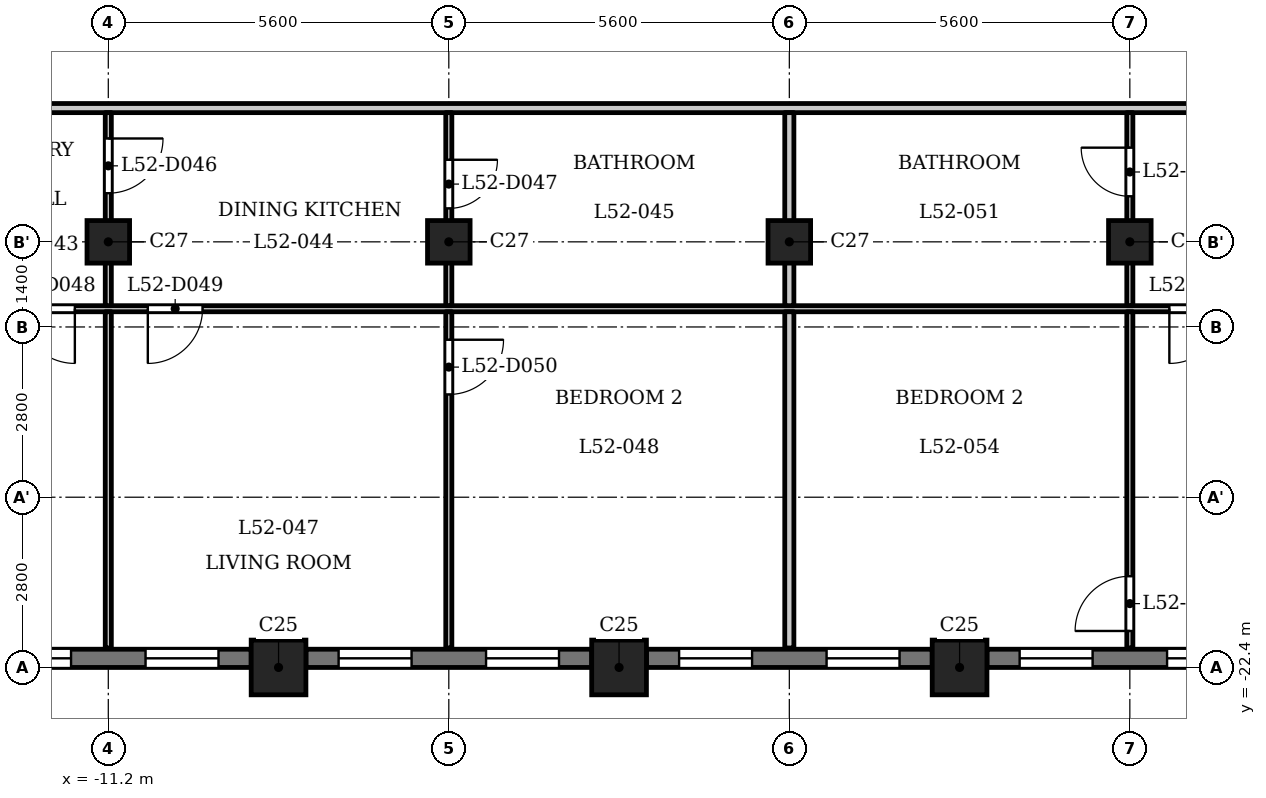
"""IFC4 building model, lengths in metres.
Left out: names, types, materials, properties, quantities, classifications, styles, units other than length and angle.
Written with IfcOpenShell. Run it as: python <this file> out.ifc"""

import sys

from ifc_helpers import new_model, si_unit, direction, frame, frame_2d, origin, origin_2d, place, context, subcontext, project, spatial, rectangle, extrude, element, fill, save


model = new_model("IFC4")
c1 = context("Model", 3, precision=1e-05, world=origin(), true_north=direction((0.0, 1.0)))
c2 = subcontext(c1, "Body", "Model", "MODEL_VIEW")
j1 = project(units=[si_unit("LENGTHUNIT", "METRE"), si_unit("PLANEANGLEUNIT", "RADIAN")], contexts=[c1])
p1 = place(None, origin())
s1 = spatial("IfcSite", under=j1, at=p1, CompositionType="ELEMENT")
p2 = place(p1, origin())
s2 = spatial("IfcBuilding", under=s1, at=p2, CompositionType="ELEMENT")
p3 = place(p2, frame((0.0, 0.0, 202.9)))
s3 = spatial("IfcBuildingStorey", under=s2, at=p3, CompositionType="ELEMENT", Elevation=202.9)
for number, where, z_axis, x_axis in (
    (1, (-8.4, -22.4, 0.0), (0.0, 0.0, 1.0), (1.0, 0.0, 0.0)),
    (2, (-2.8, -22.4, 0.0), (0.0, 0.0, 1.0), (1.0, 0.0, 0.0)),
    (3, (2.8, -22.4, 0.0), (0.0, 0.0, 1.0), (1.0, 0.0, 0.0)),
):
    element("IfcColumn", number, at=place(p3, frame(where, z_axis=z_axis, x_axis=x_axis)), inside=s3, PredefinedType="COLUMN", context=c2, shape_type="SweptSolid", body=[
        extrude(rectangle(XDim=0.9, YDim=0.9, at=origin_2d()), origin(), (0.0, 0.0, 1.0), 3.5),
    ])
for number, where, z_axis, x_axis in (
    (4, (-11.2, -15.4, 0.0), (0.0, 0.0, 1.0), (1.0, 0.0, 0.0)),
    (5, (-5.6, -15.4, 0.0), (0.0, 0.0, 1.0), (1.0, 0.0, 0.0)),
    (6, (0.0, -15.4, 0.0), (0.0, 0.0, 1.0), (1.0, 0.0, 0.0)),
    (7, (5.6, -15.4, 0.0), (0.0, 0.0, 1.0), (1.0, 0.0, 0.0)),
):
    element("IfcColumn", number, at=place(p3, frame(where, z_axis=z_axis, x_axis=x_axis)), inside=s3, PredefinedType="COLUMN", context=c2, shape_type="SweptSolid", body=[
        extrude(rectangle(XDim=0.7, YDim=0.7, at=origin_2d()), origin(), (0.0, 0.0, 1.0), 3.5),
    ])
p4 = place(p3, frame((-13.55, -22.25, 0.0), z_axis=(0.0, 0.0, 1.0), x_axis=(1.0, 0.0, 0.0)))
e8 = element("IfcWall", 8, at=p4, inside=s3, PredefinedType="SOLIDWALL", context=c2, shape_type="SweptSolid", body=[
    extrude(rectangle(XDim=4.7, YDim=0.3, at=frame_2d((2.35, 0.0))), origin(), (0.0, 0.0, 1.0), 2.5),
])
p5 = place(p4, frame((0.538, 0.0, 0.6)))
e9 = element("IfcOpeningElement", 9, at=p5, cuts=e8, PredefinedType="OPENING", context=c2, shape_type="SweptSolid", body=[
    extrude(rectangle(XDim=1.2, YDim=1.55, at=frame_2d((0.6, 0.775))), frame((0.0, 0.16, 0.0), z_axis=(0.0, -1.0, 0.0), x_axis=(1.0, 0.0, 0.0)), (0.0, 0.0, 1.0), 0.32),
])
p6 = place(p4, frame((2.962, 0.0, 0.6)))
e10 = element("IfcOpeningElement", 10, at=p6, cuts=e8, PredefinedType="OPENING", context=c2, shape_type="SweptSolid", body=[
    extrude(rectangle(XDim=1.2, YDim=1.55, at=frame_2d((0.6, 0.775))), frame((0.0, 0.16, 0.0), z_axis=(0.0, -1.0, 0.0), x_axis=(1.0, 0.0, 0.0)), (0.0, 0.0, 1.0), 0.32),
])
p7 = place(p3, frame((-7.95, -22.25, 0.0), z_axis=(0.0, 0.0, 1.0), x_axis=(1.0, 0.0, 0.0)))
e11 = element("IfcWall", 11, at=p7, inside=s3, PredefinedType="SOLIDWALL", context=c2, shape_type="SweptSolid", body=[
    extrude(rectangle(XDim=4.7, YDim=0.3, at=frame_2d((2.35, 0.0))), origin(), (0.0, 0.0, 1.0), 2.5),
])
p8 = place(p7, frame((0.538, 0.0, 0.6)))
e12 = element("IfcOpeningElement", 12, at=p8, cuts=e11, PredefinedType="OPENING", context=c2, shape_type="SweptSolid", body=[
    extrude(rectangle(XDim=1.2, YDim=1.55, at=frame_2d((0.6, 0.775))), frame((0.0, 0.16, 0.0), z_axis=(0.0, -1.0, 0.0), x_axis=(1.0, 0.0, 0.0)), (0.0, 0.0, 1.0), 0.32),
])
p9 = place(p7, frame((2.962, 0.0, 0.6)))
e13 = element("IfcOpeningElement", 13, at=p9, cuts=e11, PredefinedType="OPENING", context=c2, shape_type="SweptSolid", body=[
    extrude(rectangle(XDim=1.2, YDim=1.55, at=frame_2d((0.6, 0.775))), frame((0.0, 0.16, 0.0), z_axis=(0.0, -1.0, 0.0), x_axis=(1.0, 0.0, 0.0)), (0.0, 0.0, 1.0), 0.32),
])
p10 = place(p3, frame((-2.35, -22.25, 0.0), z_axis=(0.0, 0.0, 1.0), x_axis=(1.0, 0.0, 0.0)))
e14 = element("IfcWall", 14, at=p10, inside=s3, PredefinedType="SOLIDWALL", context=c2, shape_type="SweptSolid", body=[
    extrude(rectangle(XDim=4.7, YDim=0.3, at=frame_2d((2.35, 0.0))), origin(), (0.0, 0.0, 1.0), 2.5),
])
p11 = place(p10, frame((0.538, 0.0, 0.6)))
e15 = element("IfcOpeningElement", 15, at=p11, cuts=e14, PredefinedType="OPENING", context=c2, shape_type="SweptSolid", body=[
    extrude(rectangle(XDim=1.2, YDim=1.55, at=frame_2d((0.6, 0.775))), frame((0.0, 0.16, 0.0), z_axis=(0.0, -1.0, 0.0), x_axis=(1.0, 0.0, 0.0)), (0.0, 0.0, 1.0), 0.32),
])
p12 = place(p10, frame((2.962, 0.0, 0.6)))
e16 = element("IfcOpeningElement", 16, at=p12, cuts=e14, PredefinedType="OPENING", context=c2, shape_type="SweptSolid", body=[
    extrude(rectangle(XDim=1.2, YDim=1.55, at=frame_2d((0.6, 0.775))), frame((0.0, 0.16, 0.0), z_axis=(0.0, -1.0, 0.0), x_axis=(1.0, 0.0, 0.0)), (0.0, 0.0, 1.0), 0.32),
])
p13 = place(p3, frame((3.25, -22.25, 0.0), z_axis=(0.0, 0.0, 1.0), x_axis=(1.0, 0.0, 0.0)))
e17 = element("IfcWall", 17, at=p13, inside=s3, PredefinedType="SOLIDWALL", context=c2, shape_type="SweptSolid", body=[
    extrude(rectangle(XDim=4.7, YDim=0.3, at=frame_2d((2.35, 0.0))), origin(), (0.0, 0.0, 1.0), 2.5),
])
p14 = place(p13, frame((0.538, 0.0, 0.6)))
e18 = element("IfcOpeningElement", 18, at=p14, cuts=e17, PredefinedType="OPENING", context=c2, shape_type="SweptSolid", body=[
    extrude(rectangle(XDim=1.2, YDim=1.55, at=frame_2d((0.6, 0.775))), frame((0.0, 0.16, 0.0), z_axis=(0.0, -1.0, 0.0), x_axis=(1.0, 0.0, 0.0)), (0.0, 0.0, 1.0), 0.32),
])
p15 = place(p13, frame((2.962, 0.0, 0.6)))
e19 = element("IfcOpeningElement", 19, at=p15, cuts=e17, PredefinedType="OPENING", context=c2, shape_type="SweptSolid", body=[
    extrude(rectangle(XDim=1.2, YDim=1.55, at=frame_2d((0.6, 0.775))), frame((0.0, 0.16, 0.0), z_axis=(0.0, -1.0, 0.0), x_axis=(1.0, 0.0, 0.0)), (0.0, 0.0, 1.0), 0.32),
])
p16 = place(p3, frame((-16.725, -16.5, 0.0), z_axis=(0.0, 0.0, 1.0), x_axis=(1.0, 0.0, 0.0)))
e20 = element("IfcWall", 20, at=p16, inside=s3, PredefinedType="PARTITIONING", context=c2, shape_type="SweptSolid", body=[
    extrude(rectangle(XDim=33.45, YDim=0.1, at=frame_2d((16.725, 0.0))), origin(), (0.0, 0.0, 1.0), 3.2),
])
p17 = place(p16, frame((4.075, 0.0, 0.0)))
e21 = element("IfcOpeningElement", 21, at=p17, cuts=e20, PredefinedType="OPENING", context=c2, shape_type="SweptSolid", body=[
    extrude(rectangle(XDim=0.9, YDim=2.1, at=frame_2d((0.45, 1.05))), frame((0.0, 0.06, 0.0), z_axis=(0.0, -1.0, 0.0), x_axis=(1.0, 0.0, 0.0)), (0.0, 0.0, 1.0), 0.12),
])
p18 = place(p16, frame((6.175, 0.0, 0.0)))
e22 = element("IfcOpeningElement", 22, at=p18, cuts=e20, PredefinedType="OPENING", context=c2, shape_type="SweptSolid", body=[
    extrude(rectangle(XDim=0.9, YDim=2.1, at=frame_2d((0.45, 1.05))), frame((0.0, 0.06, 0.0), z_axis=(0.0, -1.0, 0.0), x_axis=(1.0, 0.0, 0.0)), (0.0, 0.0, 1.0), 0.12),
])
p19 = place(p16, frame((30.575, 0.0, 0.0)))
e23 = element("IfcOpeningElement", 23, at=p19, cuts=e20, PredefinedType="OPENING", context=c2, shape_type="SweptSolid", body=[
    extrude(rectangle(XDim=0.9, YDim=2.1, at=frame_2d((0.45, 1.05))), frame((0.0, 0.06, 0.0), z_axis=(0.0, -1.0, 0.0), x_axis=(1.0, 0.0, 0.0)), (0.0, 0.0, 1.0), 0.12),
])
p20 = place(p16, frame((22.975, 0.0, 0.0)))
e24 = element("IfcOpeningElement", 24, at=p20, cuts=e20, PredefinedType="OPENING", context=c2, shape_type="SweptSolid", body=[
    extrude(rectangle(XDim=0.9, YDim=2.1, at=frame_2d((0.45, 1.05))), frame((0.0, 0.06, 0.0), z_axis=(0.0, -1.0, 0.0), x_axis=(1.0, 0.0, 0.0)), (0.0, 0.0, 1.0), 0.12),
])
p21 = place(p3, frame((-17.4, -13.2, 0.0), z_axis=(0.0, 0.0, 1.0), x_axis=(1.0, 0.0, 0.0)))
e25 = element("IfcWall", 25, at=p21, inside=s3, PredefinedType="PARTITIONING", context=c2, shape_type="SweptSolid", body=[
    extrude(rectangle(XDim=34.8, YDim=0.15, at=frame_2d((17.4, 0.0))), origin(), (0.0, 0.0, 1.0), 3.2),
])
p22 = place(p21, frame((0.15, 0.0, 0.0)))
e26 = element("IfcOpeningElement", 26, at=p22, cuts=e25, PredefinedType="OPENING", context=c2, shape_type="SweptSolid", body=[
    extrude(rectangle(XDim=1.0, YDim=2.1, at=frame_2d((0.5, 1.05))), frame((0.0, 0.085, 0.0), z_axis=(0.0, -1.0, 0.0), x_axis=(1.0, 0.0, 0.0)), (0.0, 0.0, 1.0), 0.17),
])
p23 = place(p21, frame((33.55, 0.0, 0.0)))
e27 = element("IfcOpeningElement", 27, at=p23, cuts=e25, PredefinedType="OPENING", context=c2, shape_type="SweptSolid", body=[
    extrude(rectangle(XDim=1.0, YDim=2.1, at=frame_2d((0.5, 1.05))), frame((0.0, 0.085, 0.0), z_axis=(0.0, -1.0, 0.0), x_axis=(1.0, 0.0, 0.0)), (0.0, 0.0, 1.0), 0.17),
])
p24 = place(p3, frame((-11.2, -22.08, 0.0), z_axis=(0.0, 0.0, 1.0), x_axis=(0.0, 1.0, 0.0)))
e28 = element("IfcWall", 28, at=p24, inside=s3, PredefinedType="PARTITIONING", context=c2, shape_type="SweptSolid", body=[
    extrude(rectangle(XDim=5.53, YDim=0.1, at=frame_2d((2.765, 0.0))), origin(), (0.0, 0.0, 1.0), 3.2),
])
p25 = place(p3, frame((-11.2, -16.45, 0.0), z_axis=(0.0, 0.0, 1.0), x_axis=(0.0, 1.0, 0.0)))
e29 = element("IfcWall", 29, at=p25, inside=s3, PredefinedType="PARTITIONING", context=c2, shape_type="SweptSolid", body=[
    extrude(rectangle(XDim=3.175, YDim=0.1, at=frame_2d((1.587, 0.0))), origin(), (0.0, 0.0, 1.0), 3.2),
])
p26 = place(p25, frame((1.85, 0.0, 0.0)))
e30 = element("IfcOpeningElement", 30, at=p26, cuts=e29, PredefinedType="OPENING", context=c2, shape_type="SweptSolid", body=[
    extrude(rectangle(XDim=0.9, YDim=2.1, at=frame_2d((0.45, 1.05))), frame((0.0, 0.06, 0.0), z_axis=(0.0, -1.0, 0.0), x_axis=(1.0, 0.0, 0.0)), (0.0, 0.0, 1.0), 0.12),
])
p27 = place(p3, frame((-5.6, -22.08, 0.0), z_axis=(0.0, 0.0, 1.0), x_axis=(0.0, 1.0, 0.0)))
e31 = element("IfcWall", 31, at=p27, inside=s3, PredefinedType="PARTITIONING", context=c2, shape_type="SweptSolid", body=[
    extrude(rectangle(XDim=5.53, YDim=0.1, at=frame_2d((2.765, 0.0))), origin(), (0.0, 0.0, 1.0), 3.2),
])
p28 = place(p27, frame((4.17, 0.0, 0.0)))
e32 = element("IfcOpeningElement", 32, at=p28, cuts=e31, PredefinedType="OPENING", context=c2, shape_type="SweptSolid", body=[
    extrude(rectangle(XDim=0.9, YDim=2.1, at=frame_2d((0.45, 1.05))), frame((0.0, 0.06, 0.0), z_axis=(0.0, -1.0, 0.0), x_axis=(1.0, 0.0, 0.0)), (0.0, 0.0, 1.0), 0.12),
])
p29 = place(p3, frame((-5.6, -16.45, 0.0), z_axis=(0.0, 0.0, 1.0), x_axis=(0.0, 1.0, 0.0)))
e33 = element("IfcWall", 33, at=p29, inside=s3, PredefinedType="PARTITIONING", context=c2, shape_type="SweptSolid", body=[
    extrude(rectangle(XDim=3.175, YDim=0.1, at=frame_2d((1.587, 0.0))), origin(), (0.0, 0.0, 1.0), 3.2),
])
p30 = place(p29, frame((1.6, 0.0, 0.0)))
e34 = element("IfcOpeningElement", 34, at=p30, cuts=e33, PredefinedType="OPENING", context=c2, shape_type="SweptSolid", body=[
    extrude(rectangle(XDim=0.8, YDim=2.1, at=frame_2d((0.4, 1.05))), frame((0.0, 0.06, 0.0), z_axis=(0.0, -1.0, 0.0), x_axis=(1.0, 0.0, 0.0)), (0.0, 0.0, 1.0), 0.12),
])
p31 = place(p3, frame((0.0, -22.08, 0.0), z_axis=(0.0, 0.0, 1.0), x_axis=(0.0, 1.0, 0.0)))
e35 = element("IfcWall", 35, at=p31, inside=s3, PredefinedType="PARTITIONING", context=c2, shape_type="SweptSolid", body=[
    extrude(rectangle(XDim=5.53, YDim=0.15, at=frame_2d((2.765, 0.0))), origin(), (0.0, 0.0, 1.0), 3.2),
])
p32 = place(p3, frame((0.0, -16.45, 0.0), z_axis=(0.0, 0.0, 1.0), x_axis=(0.0, 1.0, 0.0)))
e36 = element("IfcWall", 36, at=p32, inside=s3, PredefinedType="PARTITIONING", context=c2, shape_type="SweptSolid", body=[
    extrude(rectangle(XDim=3.175, YDim=0.15, at=frame_2d((1.587, 0.0))), origin(), (0.0, 0.0, 1.0), 3.2),
])
p33 = place(p3, frame((5.6, -22.08, 0.0), z_axis=(0.0, 0.0, 1.0), x_axis=(0.0, 1.0, 0.0)))
e37 = element("IfcWall", 37, at=p33, inside=s3, PredefinedType="PARTITIONING", context=c2, shape_type="SweptSolid", body=[
    extrude(rectangle(XDim=5.53, YDim=0.1, at=frame_2d((2.765, 0.0))), origin(), (0.0, 0.0, 1.0), 3.2),
])
p34 = place(p33, frame((0.28, 0.0, 0.0)))
e38 = element("IfcOpeningElement", 38, at=p34, cuts=e37, PredefinedType="OPENING", context=c2, shape_type="SweptSolid", body=[
    extrude(rectangle(XDim=0.9, YDim=2.1, at=frame_2d((0.45, 1.05))), frame((0.0, 0.06, 0.0), z_axis=(0.0, -1.0, 0.0), x_axis=(1.0, 0.0, 0.0)), (0.0, 0.0, 1.0), 0.12),
])
p35 = place(p3, frame((5.6, -16.45, 0.0), z_axis=(0.0, 0.0, 1.0), x_axis=(0.0, 1.0, 0.0)))
e39 = element("IfcWall", 39, at=p35, inside=s3, PredefinedType="PARTITIONING", context=c2, shape_type="SweptSolid", body=[
    extrude(rectangle(XDim=3.175, YDim=0.1, at=frame_2d((1.587, 0.0))), origin(), (0.0, 0.0, 1.0), 3.2),
])
p36 = place(p35, frame((1.799, 0.0, 0.0)))
e40 = element("IfcOpeningElement", 40, at=p36, cuts=e39, PredefinedType="OPENING", context=c2, shape_type="SweptSolid", body=[
    extrude(rectangle(XDim=0.8, YDim=2.1, at=frame_2d((0.4, 1.05))), frame((0.0, 0.06, 0.0), z_axis=(0.0, -1.0, 0.0), x_axis=(1.0, 0.0, 0.0)), (0.0, 0.0, 1.0), 0.12),
])
p37 = place(p26, origin())
e41 = element("IfcDoor", 41, at=p37, inside=s3, OperationType="SINGLE_SWING_RIGHT", PredefinedType="DOOR", context=c2, shape_type="SweptSolid", body=[
    extrude(rectangle(XDim=0.9, YDim=2.1, at=frame_2d((0.45, 1.05))), frame((0.0, 0.025, 0.0), z_axis=(0.0, -1.0, 0.0), x_axis=(1.0, 0.0, 0.0)), (0.0, 0.0, 1.0), 0.05),
])
fill(e30, e41)
p38 = place(p30, origin())
e42 = element("IfcDoor", 42, at=p38, inside=s3, OperationType="SINGLE_SWING_RIGHT", PredefinedType="DOOR", context=c2, shape_type="SweptSolid", body=[
    extrude(rectangle(XDim=0.8, YDim=2.1, at=frame_2d((0.4, 1.05))), frame((0.0, 0.025, 0.0), z_axis=(0.0, -1.0, 0.0), x_axis=(1.0, 0.0, 0.0)), (0.0, 0.0, 1.0), 0.05),
])
fill(e34, e42)
p39 = place(p17, origin())
e43 = element("IfcDoor", 43, at=p39, inside=s3, OperationType="SINGLE_SWING_RIGHT", PredefinedType="DOOR", context=c2, shape_type="SweptSolid", body=[
    extrude(rectangle(XDim=0.9, YDim=2.1, at=frame_2d((0.45, 1.05))), frame((0.0, 0.025, 0.0), z_axis=(0.0, -1.0, 0.0), x_axis=(1.0, 0.0, 0.0)), (0.0, 0.0, 1.0), 0.05),
])
fill(e21, e43)
p40 = place(p18, origin())
e44 = element("IfcDoor", 44, at=p40, inside=s3, OperationType="SINGLE_SWING_LEFT", PredefinedType="DOOR", context=c2, shape_type="SweptSolid", body=[
    extrude(rectangle(XDim=0.9, YDim=2.1, at=frame_2d((0.45, 1.05))), frame((0.0, 0.025, 0.0), z_axis=(0.0, -1.0, 0.0), x_axis=(1.0, 0.0, 0.0)), (0.0, 0.0, 1.0), 0.05),
])
fill(e22, e44)
p41 = place(p28, origin())
e45 = element("IfcDoor", 45, at=p41, inside=s3, OperationType="SINGLE_SWING_RIGHT", PredefinedType="DOOR", context=c2, shape_type="SweptSolid", body=[
    extrude(rectangle(XDim=0.9, YDim=2.1, at=frame_2d((0.45, 1.05))), frame((0.0, 0.025, 0.0), z_axis=(0.0, -1.0, 0.0), x_axis=(1.0, 0.0, 0.0)), (0.0, 0.0, 1.0), 0.05),
])
fill(e32, e45)
p42 = place(p36, origin())
e46 = element("IfcDoor", 46, at=p42, inside=s3, OperationType="SINGLE_SWING_LEFT", PredefinedType="DOOR", context=c2, shape_type="SweptSolid", body=[
    extrude(rectangle(XDim=0.8, YDim=2.1, at=frame_2d((0.4, 1.05))), frame((0.0, 0.025, 0.0), z_axis=(0.0, -1.0, 0.0), x_axis=(1.0, 0.0, 0.0)), (0.0, 0.0, 1.0), 0.05),
])
fill(e40, e46)
p43 = place(p20, origin())
e47 = element("IfcDoor", 47, at=p43, inside=s3, OperationType="SINGLE_SWING_LEFT", PredefinedType="DOOR", context=c2, shape_type="SweptSolid", body=[
    extrude(rectangle(XDim=0.9, YDim=2.1, at=frame_2d((0.45, 1.05))), frame((0.0, 0.025, 0.0), z_axis=(0.0, -1.0, 0.0), x_axis=(1.0, 0.0, 0.0)), (0.0, 0.0, 1.0), 0.05),
])
fill(e24, e47)
p44 = place(p34, origin())
e48 = element("IfcDoor", 48, at=p44, inside=s3, OperationType="SINGLE_SWING_RIGHT", PredefinedType="DOOR", context=c2, shape_type="SweptSolid", body=[
    extrude(rectangle(XDim=0.9, YDim=2.1, at=frame_2d((0.45, 1.05))), frame((0.0, 0.025, 0.0), z_axis=(0.0, -1.0, 0.0), x_axis=(1.0, 0.0, 0.0)), (0.0, 0.0, 1.0), 0.05),
])
fill(e38, e48)
p45 = place(p5, origin())
e49 = element("IfcWindow", 49, at=p45, inside=s3, PartitioningType="SINGLE_PANEL", PredefinedType="WINDOW", context=c2, shape_type="SweptSolid", body=[
    extrude(rectangle(XDim=1.2, YDim=1.55, at=frame_2d((0.6, 0.775))), frame((0.0, 0.03, 0.0), z_axis=(0.0, -1.0, 0.0), x_axis=(1.0, 0.0, 0.0)), (0.0, 0.0, 1.0), 0.06),
])
fill(e9, e49)
p46 = place(p6, origin())
e50 = element("IfcWindow", 50, at=p46, inside=s3, PartitioningType="SINGLE_PANEL", PredefinedType="WINDOW", context=c2, shape_type="SweptSolid", body=[
    extrude(rectangle(XDim=1.2, YDim=1.55, at=frame_2d((0.6, 0.775))), frame((0.0, 0.03, 0.0), z_axis=(0.0, -1.0, 0.0), x_axis=(1.0, 0.0, 0.0)), (0.0, 0.0, 1.0), 0.06),
])
fill(e10, e50)
p47 = place(p8, origin())
e51 = element("IfcWindow", 51, at=p47, inside=s3, PartitioningType="SINGLE_PANEL", PredefinedType="WINDOW", context=c2, shape_type="SweptSolid", body=[
    extrude(rectangle(XDim=1.2, YDim=1.55, at=frame_2d((0.6, 0.775))), frame((0.0, 0.03, 0.0), z_axis=(0.0, -1.0, 0.0), x_axis=(1.0, 0.0, 0.0)), (0.0, 0.0, 1.0), 0.06),
])
fill(e12, e51)
p48 = place(p9, origin())
e52 = element("IfcWindow", 52, at=p48, inside=s3, PartitioningType="SINGLE_PANEL", PredefinedType="WINDOW", context=c2, shape_type="SweptSolid", body=[
    extrude(rectangle(XDim=1.2, YDim=1.55, at=frame_2d((0.6, 0.775))), frame((0.0, 0.03, 0.0), z_axis=(0.0, -1.0, 0.0), x_axis=(1.0, 0.0, 0.0)), (0.0, 0.0, 1.0), 0.06),
])
fill(e13, e52)
p49 = place(p11, origin())
e53 = element("IfcWindow", 53, at=p49, inside=s3, PartitioningType="SINGLE_PANEL", PredefinedType="WINDOW", context=c2, shape_type="SweptSolid", body=[
    extrude(rectangle(XDim=1.2, YDim=1.55, at=frame_2d((0.6, 0.775))), frame((0.0, 0.03, 0.0), z_axis=(0.0, -1.0, 0.0), x_axis=(1.0, 0.0, 0.0)), (0.0, 0.0, 1.0), 0.06),
])
fill(e15, e53)
p50 = place(p12, origin())
e54 = element("IfcWindow", 54, at=p50, inside=s3, PartitioningType="SINGLE_PANEL", PredefinedType="WINDOW", context=c2, shape_type="SweptSolid", body=[
    extrude(rectangle(XDim=1.2, YDim=1.55, at=frame_2d((0.6, 0.775))), frame((0.0, 0.03, 0.0), z_axis=(0.0, -1.0, 0.0), x_axis=(1.0, 0.0, 0.0)), (0.0, 0.0, 1.0), 0.06),
])
fill(e16, e54)
p51 = place(p14, origin())
e55 = element("IfcWindow", 55, at=p51, inside=s3, PartitioningType="SINGLE_PANEL", PredefinedType="WINDOW", context=c2, shape_type="SweptSolid", body=[
    extrude(rectangle(XDim=1.2, YDim=1.55, at=frame_2d((0.6, 0.775))), frame((0.0, 0.03, 0.0), z_axis=(0.0, -1.0, 0.0), x_axis=(1.0, 0.0, 0.0)), (0.0, 0.0, 1.0), 0.06),
])
fill(e18, e55)
p52 = place(p15, origin())
e56 = element("IfcWindow", 56, at=p52, inside=s3, PartitioningType="SINGLE_PANEL", PredefinedType="WINDOW", context=c2, shape_type="SweptSolid", body=[
    extrude(rectangle(XDim=1.2, YDim=1.55, at=frame_2d((0.6, 0.775))), frame((0.0, 0.03, 0.0), z_axis=(0.0, -1.0, 0.0), x_axis=(1.0, 0.0, 0.0)), (0.0, 0.0, 1.0), 0.06),
])
fill(e19, e56)
save(model, sys.argv[1])
